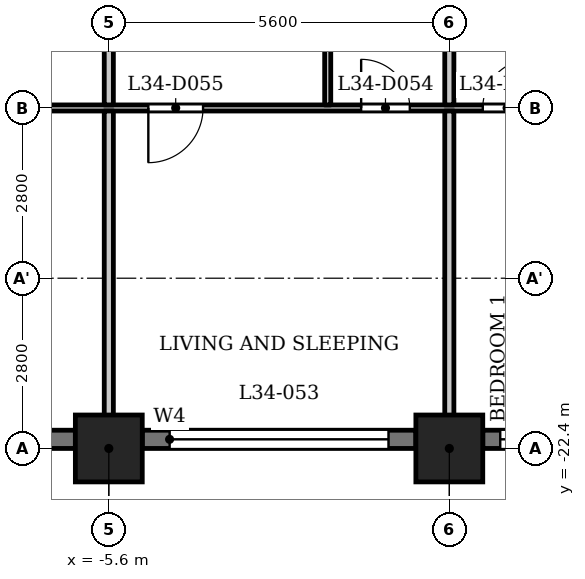
"""IFC4 building model, lengths in metres.
Left out: names, types, materials, properties, quantities, classifications, styles, units other than length and angle.
Written with IfcOpenShell. Run it as: python <this file> out.ifc"""

import sys

from ifc_helpers import new_model, si_unit, direction, frame, frame_2d, origin, origin_2d, place, context, subcontext, project, spatial, rectangle, extrude, element, fill, save


model = new_model("IFC4")
c1 = context("Model", 3, precision=1e-05, world=origin(), true_north=direction((0.0, 1.0)))
c2 = subcontext(c1, "Body", "Model", "MODEL_VIEW")
j1 = project(units=[si_unit("LENGTHUNIT", "METRE"), si_unit("PLANEANGLEUNIT", "RADIAN")], contexts=[c1])
p1 = place(None, origin())
s1 = spatial("IfcSite", under=j1, at=p1, CompositionType="ELEMENT")
p2 = place(p1, origin())
s2 = spatial("IfcBuilding", under=s1, at=p2, CompositionType="ELEMENT")
p3 = place(p2, frame((0.0, 0.0, 136.1)))
s3 = spatial("IfcBuildingStorey", under=s2, at=p3, CompositionType="ELEMENT", Elevation=136.1)
for number, where, z_axis, x_axis in (
    (1, (-5.6, -22.4, 0.0), (0.0, 0.0, 1.0), (1.0, 0.0, 0.0)),
    (2, (0.0, -22.4, 0.0), (0.0, 0.0, 1.0), (1.0, 0.0, 0.0)),
):
    element("IfcColumn", number, at=place(p3, frame(where, z_axis=z_axis, x_axis=x_axis)), inside=s3, PredefinedType="COLUMN", context=c2, shape_type="SweptSolid", body=[
        extrude(rectangle(XDim=1.1, YDim=1.1, at=origin_2d()), origin(), (0.0, 0.0, 1.0), 3.5),
    ])
p4 = place(p3, frame((-10.65, -22.25, 0.0), z_axis=(0.0, 0.0, 1.0), x_axis=(1.0, 0.0, 0.0)))
e3 = element("IfcWall", 3, at=p4, inside=s3, PredefinedType="SOLIDWALL", context=c2, shape_type="SweptSolid", body=[
    extrude(rectangle(XDim=4.5, YDim=0.3, at=frame_2d((2.25, 0.0))), origin(), (0.0, 0.0, 1.0), 2.45),
])
p5 = place(p4, frame((0.45, 0.0, 1.2)))
e4 = element("IfcOpeningElement", 4, at=p5, cuts=e3, PredefinedType="OPENING", context=c2, shape_type="SweptSolid", body=[
    extrude(rectangle(XDim=3.6, YDim=0.95, at=frame_2d((1.8, 0.475))), frame((0.0, 0.16, 0.0), z_axis=(0.0, -1.0, 0.0), x_axis=(1.0, 0.0, 0.0)), (0.0, 0.0, 1.0), 0.32),
])
p6 = place(p3, frame((-5.05, -22.25, 0.0), z_axis=(0.0, 0.0, 1.0), x_axis=(1.0, 0.0, 0.0)))
e5 = element("IfcWall", 5, at=p6, inside=s3, PredefinedType="SOLIDWALL", context=c2, shape_type="SweptSolid", body=[
    extrude(rectangle(XDim=4.5, YDim=0.3, at=frame_2d((2.25, 0.0))), origin(), (0.0, 0.0, 1.0), 2.45),
])
p7 = place(p6, frame((0.45, 0.0, 1.2)))
e6 = element("IfcOpeningElement", 6, at=p7, cuts=e5, PredefinedType="OPENING", context=c2, shape_type="SweptSolid", body=[
    extrude(rectangle(XDim=3.6, YDim=0.95, at=frame_2d((1.8, 0.475))), frame((0.0, 0.16, 0.0), z_axis=(0.0, -1.0, 0.0), x_axis=(1.0, 0.0, 0.0)), (0.0, 0.0, 1.0), 0.32),
])
p8 = place(p3, frame((0.55, -22.25, 0.0), z_axis=(0.0, 0.0, 1.0), x_axis=(1.0, 0.0, 0.0)))
e7 = element("IfcWall", 7, at=p8, inside=s3, PredefinedType="SOLIDWALL", context=c2, shape_type="SweptSolid", body=[
    extrude(rectangle(XDim=4.5, YDim=0.3, at=frame_2d((2.25, 0.0))), origin(), (0.0, 0.0, 1.0), 2.45),
])
p9 = place(p8, frame((0.288, 0.0, 0.6)))
e8 = element("IfcOpeningElement", 8, at=p9, cuts=e7, PredefinedType="OPENING", context=c2, shape_type="SweptSolid", body=[
    extrude(rectangle(XDim=1.2, YDim=1.55, at=frame_2d((0.6, 0.775))), frame((0.0, 0.16, 0.0), z_axis=(0.0, -1.0, 0.0), x_axis=(1.0, 0.0, 0.0)), (0.0, 0.0, 1.0), 0.32),
])
p10 = place(p8, frame((2.312, 0.0, 0.9)))
e9 = element("IfcOpeningElement", 9, at=p10, cuts=e7, PredefinedType="OPENING", context=c2, shape_type="SweptSolid", body=[
    extrude(rectangle(XDim=1.8, YDim=1.25, at=frame_2d((0.9, 0.625))), frame((0.0, 0.16, 0.0), z_axis=(0.0, -1.0, 0.0), x_axis=(1.0, 0.0, 0.0)), (0.0, 0.0, 1.0), 0.32),
])
p11 = place(p3, frame((-16.725, -16.8, 0.0), z_axis=(0.0, 0.0, 1.0), x_axis=(1.0, 0.0, 0.0)))
e10 = element("IfcWall", 10, at=p11, inside=s3, PredefinedType="PARTITIONING", context=c2, shape_type="SweptSolid", body=[
    extrude(rectangle(XDim=33.45, YDim=0.1, at=frame_2d((16.725, 0.0))), origin(), (0.0, 0.0, 1.0), 3.2),
])
p12 = place(p11, frame((0.575, 0.0, 0.0)))
e11 = element("IfcOpeningElement", 11, at=p12, cuts=e10, PredefinedType="OPENING", context=c2, shape_type="SweptSolid", body=[
    extrude(rectangle(XDim=0.8, YDim=2.1, at=frame_2d((0.4, 1.05))), frame((0.0, 0.06, 0.0), z_axis=(0.0, -1.0, 0.0), x_axis=(1.0, 0.0, 0.0)), (0.0, 0.0, 1.0), 0.12),
])
p13 = place(p11, frame((6.175, 0.0, 0.0)))
e12 = element("IfcOpeningElement", 12, at=p13, cuts=e10, PredefinedType="OPENING", context=c2, shape_type="SweptSolid", body=[
    extrude(rectangle(XDim=0.9, YDim=2.1, at=frame_2d((0.45, 1.05))), frame((0.0, 0.06, 0.0), z_axis=(0.0, -1.0, 0.0), x_axis=(1.0, 0.0, 0.0)), (0.0, 0.0, 1.0), 0.12),
])
p14 = place(p11, frame((15.275, 0.0, 0.0)))
e13 = element("IfcOpeningElement", 13, at=p14, cuts=e10, PredefinedType="OPENING", context=c2, shape_type="SweptSolid", body=[
    extrude(rectangle(XDim=0.8, YDim=2.1, at=frame_2d((0.4, 1.05))), frame((0.0, 0.06, 0.0), z_axis=(0.0, -1.0, 0.0), x_axis=(1.0, 0.0, 0.0)), (0.0, 0.0, 1.0), 0.12),
])
p15 = place(p11, frame((11.775, 0.0, 0.0)))
e14 = element("IfcOpeningElement", 14, at=p15, cuts=e10, PredefinedType="OPENING", context=c2, shape_type="SweptSolid", body=[
    extrude(rectangle(XDim=0.9, YDim=2.1, at=frame_2d((0.45, 1.05))), frame((0.0, 0.06, 0.0), z_axis=(0.0, -1.0, 0.0), x_axis=(1.0, 0.0, 0.0)), (0.0, 0.0, 1.0), 0.12),
])
p16 = place(p11, frame((17.275, 0.0, 0.0)))
e15 = element("IfcOpeningElement", 15, at=p16, cuts=e10, PredefinedType="OPENING", context=c2, shape_type="SweptSolid", body=[
    extrude(rectangle(XDim=0.8, YDim=2.1, at=frame_2d((0.4, 1.05))), frame((0.0, 0.06, 0.0), z_axis=(0.0, -1.0, 0.0), x_axis=(1.0, 0.0, 0.0)), (0.0, 0.0, 1.0), 0.12),
])
p17 = place(p11, frame((20.775, 0.0, 0.0)))
e16 = element("IfcOpeningElement", 16, at=p17, cuts=e10, PredefinedType="OPENING", context=c2, shape_type="SweptSolid", body=[
    extrude(rectangle(XDim=0.9, YDim=2.1, at=frame_2d((0.45, 1.05))), frame((0.0, 0.06, 0.0), z_axis=(0.0, -1.0, 0.0), x_axis=(1.0, 0.0, 0.0)), (0.0, 0.0, 1.0), 0.12),
])
p18 = place(p11, frame((31.575, 0.0, 0.0)))
e17 = element("IfcOpeningElement", 17, at=p18, cuts=e10, PredefinedType="OPENING", context=c2, shape_type="SweptSolid", body=[
    extrude(rectangle(XDim=0.8, YDim=2.1, at=frame_2d((0.4, 1.05))), frame((0.0, 0.06, 0.0), z_axis=(0.0, -1.0, 0.0), x_axis=(1.0, 0.0, 0.0)), (0.0, 0.0, 1.0), 0.12),
])
p19 = place(p11, frame((28.575, 0.0, 0.0)))
e18 = element("IfcOpeningElement", 18, at=p19, cuts=e10, PredefinedType="OPENING", context=c2, shape_type="SweptSolid", body=[
    extrude(rectangle(XDim=0.9, YDim=2.1, at=frame_2d((0.45, 1.05))), frame((0.0, 0.06, 0.0), z_axis=(0.0, -1.0, 0.0), x_axis=(1.0, 0.0, 0.0)), (0.0, 0.0, 1.0), 0.12),
])
p20 = place(p11, frame((23.725, 0.0, 0.0)))
e19 = element("IfcOpeningElement", 19, at=p20, cuts=e10, PredefinedType="OPENING", context=c2, shape_type="SweptSolid", body=[
    extrude(rectangle(XDim=0.9, YDim=2.1, at=frame_2d((0.45, 1.05))), frame((0.0, 0.06, 0.0), z_axis=(0.0, -1.0, 0.0), x_axis=(1.0, 0.0, 0.0)), (0.0, 0.0, 1.0), 0.12),
])
p21 = place(p11, frame((26.225, 0.0, 0.0)))
e20 = element("IfcOpeningElement", 20, at=p21, cuts=e10, PredefinedType="OPENING", context=c2, shape_type="SweptSolid", body=[
    extrude(rectangle(XDim=0.9, YDim=2.1, at=frame_2d((0.45, 1.05))), frame((0.0, 0.06, 0.0), z_axis=(0.0, -1.0, 0.0), x_axis=(1.0, 0.0, 0.0)), (0.0, 0.0, 1.0), 0.12),
])
p22 = place(p3, frame((-5.6, -22.93, 0.0), z_axis=(0.0, 0.0, 1.0), x_axis=(0.0, 1.0, 0.0)))
e21 = element("IfcWall", 21, at=p22, inside=s3, PredefinedType="PARTITIONING", context=c2, shape_type="SweptSolid", body=[
    extrude(rectangle(XDim=6.08, YDim=0.15, at=frame_2d((3.04, 0.0))), origin(), (0.0, 0.0, 1.0), 3.2),
])
p23 = place(p3, frame((-5.6, -16.75, 0.0), z_axis=(0.0, 0.0, 1.0), x_axis=(0.0, 1.0, 0.0)))
e22 = element("IfcWall", 22, at=p23, inside=s3, PredefinedType="PARTITIONING", context=c2, shape_type="SweptSolid", body=[
    extrude(rectangle(XDim=3.475, YDim=0.15, at=frame_2d((1.738, 0.0))), origin(), (0.0, 0.0, 1.0), 3.2),
])
p24 = place(p3, frame((-2.0, -16.75, 0.0), z_axis=(0.0, 0.0, 1.0), x_axis=(0.0, 1.0, 0.0)))
e23 = element("IfcWall", 23, at=p24, inside=s3, PredefinedType="PARTITIONING", context=c2, shape_type="SweptSolid", body=[
    extrude(rectangle(XDim=3.475, YDim=0.1, at=frame_2d((1.738, 0.0))), origin(), (0.0, 0.0, 1.0), 3.2),
])
p25 = place(p3, frame((0.0, -22.93, 0.0), z_axis=(0.0, 0.0, 1.0), x_axis=(0.0, 1.0, 0.0)))
e24 = element("IfcWall", 24, at=p25, inside=s3, PredefinedType="PARTITIONING", context=c2, shape_type="SweptSolid", body=[
    extrude(rectangle(XDim=6.08, YDim=0.15, at=frame_2d((3.04, 0.0))), origin(), (0.0, 0.0, 1.0), 3.2),
])
p26 = place(p3, frame((0.0, -16.75, 0.0), z_axis=(0.0, 0.0, 1.0), x_axis=(0.0, 1.0, 0.0)))
e25 = element("IfcWall", 25, at=p26, inside=s3, PredefinedType="PARTITIONING", context=c2, shape_type="SweptSolid", body=[
    extrude(rectangle(XDim=3.475, YDim=0.15, at=frame_2d((1.738, 0.0))), origin(), (0.0, 0.0, 1.0), 3.2),
])
p27 = place(p14, origin())
e26 = element("IfcDoor", 26, at=p27, inside=s3, OperationType="SINGLE_SWING_RIGHT", PredefinedType="DOOR", context=c2, shape_type="SweptSolid", body=[
    extrude(rectangle(XDim=0.8, YDim=2.1, at=frame_2d((0.4, 1.05))), frame((0.0, 0.025, 0.0), z_axis=(0.0, -1.0, 0.0), x_axis=(1.0, 0.0, 0.0)), (0.0, 0.0, 1.0), 0.05),
])
fill(e13, e26)
p28 = place(p15, origin())
e27 = element("IfcDoor", 27, at=p28, inside=s3, OperationType="SINGLE_SWING_LEFT", PredefinedType="DOOR", context=c2, shape_type="SweptSolid", body=[
    extrude(rectangle(XDim=0.9, YDim=2.1, at=frame_2d((0.45, 1.05))), frame((0.0, 0.025, 0.0), z_axis=(0.0, -1.0, 0.0), x_axis=(1.0, 0.0, 0.0)), (0.0, 0.0, 1.0), 0.05),
])
fill(e14, e27)
p29 = place(p16, origin())
e28 = element("IfcDoor", 28, at=p29, inside=s3, OperationType="SINGLE_SWING_LEFT", PredefinedType="DOOR", context=c2, shape_type="SweptSolid", body=[
    extrude(rectangle(XDim=0.8, YDim=2.1, at=frame_2d((0.4, 1.05))), frame((0.0, 0.025, 0.0), z_axis=(0.0, -1.0, 0.0), x_axis=(1.0, 0.0, 0.0)), (0.0, 0.0, 1.0), 0.05),
])
fill(e15, e28)
p30 = place(p7, origin())
e29 = element("IfcWindow", 29, at=p30, inside=s3, PartitioningType="SINGLE_PANEL", PredefinedType="WINDOW", context=c2, shape_type="SweptSolid", body=[
    extrude(rectangle(XDim=3.6, YDim=0.95, at=frame_2d((1.8, 0.475))), frame((0.0, 0.03, 0.0), z_axis=(0.0, -1.0, 0.0), x_axis=(1.0, 0.0, 0.0)), (0.0, 0.0, 1.0), 0.06),
])
fill(e6, e29)
p31 = place(p9, origin())
e30 = element("IfcWindow", 30, at=p31, inside=s3, PartitioningType="SINGLE_PANEL", PredefinedType="WINDOW", context=c2, shape_type="SweptSolid", body=[
    extrude(rectangle(XDim=1.2, YDim=1.55, at=frame_2d((0.6, 0.775))), frame((0.0, 0.03, 0.0), z_axis=(0.0, -1.0, 0.0), x_axis=(1.0, 0.0, 0.0)), (0.0, 0.0, 1.0), 0.06),
])
fill(e8, e30)
save(model, sys.argv[1])
